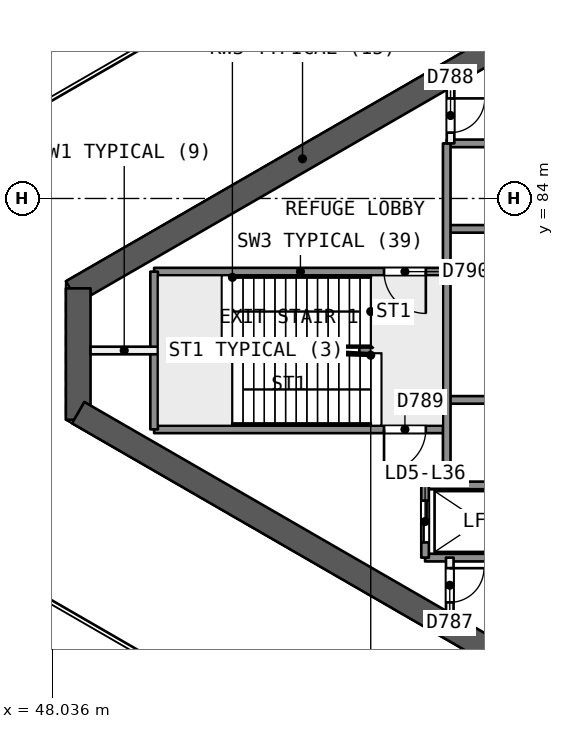
"""IFC4 building model, lengths in metres.
Left out: names, types, materials, properties, quantities, classifications, styles, units other than length and angle.
Written with IfcOpenShell. Run it as: python <this file> out.ifc"""

import sys

from ifc_helpers import new_model, si_unit, direction, frame, frame_2d, origin, place, context, subcontext, project, spatial, rectangle, extrude, element, fill, save


model = new_model("IFC4")
c1 = context("Model", 3, precision=1e-05, world=origin(), true_north=direction((0.0, 1.0)))
c2 = subcontext(c1, "Body", "Model", "MODEL_VIEW")
j1 = project(units=[si_unit("LENGTHUNIT", "METRE"), si_unit("PLANEANGLEUNIT", "RADIAN")], contexts=[c1])
p1 = place(None, origin())
s1 = spatial("IfcSite", under=j1, at=p1, CompositionType="ELEMENT")
p2 = place(p1, origin())
s2 = spatial("IfcBuilding", under=s1, at=p2, CompositionType="ELEMENT")
p3 = place(p2, frame((0.0, 0.0, 147.5)))
s3 = spatial("IfcBuildingStorey", under=s2, at=p3, CompositionType="ELEMENT", Elevation=147.5)
p4 = place(p3, frame((60.691, 88.545, 0.0), z_axis=(0.0, 0.0, 1.0), x_axis=(-0.866030607649, -0.499990986534, 0.0)))
e1 = element("IfcWall", 1, at=p4, inside=s3, PredefinedType="SHEAR", context=c2, shape_type="SweptSolid", body=[
    extrude(rectangle(XDim=14.009, YDim=0.65, at=frame_2d((7.004, 0.0))), origin(), (0.0, 0.0, 1.0), 8.8),
])
p5 = place(p3, frame((48.722, 81.635, 0.0), z_axis=(0.0, 0.0, 1.0), x_axis=(0.0, -1.0, 0.0)))
e2 = element("IfcWall", 2, at=p5, inside=s3, PredefinedType="SHEAR", context=c2, shape_type="SweptSolid", body=[
    extrude(rectangle(XDim=3.458, YDim=0.65, at=frame_2d((1.729, 0.0))), origin(), (0.0, 0.0, 1.0), 8.8),
])
p6 = place(p3, frame((48.722, 78.365, 0.0), z_axis=(0.0, 0.0, 1.0), x_axis=(0.866020036431, -0.500009296414, 0.0)))
e3 = element("IfcWall", 3, at=p6, inside=s3, PredefinedType="SHEAR", context=c2, shape_type="SweptSolid", body=[
    extrude(rectangle(XDim=14.146, YDim=0.65, at=frame_2d((7.073, 0.0))), origin(), (0.0, 0.0, 1.0), 8.8),
])
for number, where, z_axis, x_axis in (
    (4, (60.9, 85.45, 0.0), (0.0, 0.0, 1.0), (-1.0, 0.0, 0.0)),
    (5, (60.9, 83.2, 0.0), (0.0, 0.0, 1.0), (-1.0, 0.0, 0.0)),
):
    element("IfcWall", number, at=place(p3, frame(where, z_axis=z_axis, x_axis=x_axis)), inside=s3, PredefinedType="SOLIDWALL", context=c2, shape_type="SweptSolid", body=[
        extrude(rectangle(XDim=2.48, YDim=0.2, at=frame_2d((1.24, 0.0))), origin(), (0.0, 0.0, 1.0), 8.35),
    ])
p7 = place(p3, frame((58.42, 82.075, 0.0), z_axis=(0.0, 0.0, 1.0), x_axis=(-1.0, 0.0, 0.0)))
e6 = element("IfcWall", 6, at=p7, inside=s3, PredefinedType="SOLIDWALL", context=c2, shape_type="SweptSolid", body=[
    extrude(rectangle(XDim=7.7, YDim=0.2, at=frame_2d((3.85, 0.0))), origin(), (0.0, 0.0, 1.0), 8.35),
])
p8 = place(p7, frame((0.55, 0.0, 0.0)))
e7 = element("IfcOpeningElement", 7, at=p8, cuts=e6, PredefinedType="OPENING", context=c2, shape_type="SweptSolid", body=[
    extrude(rectangle(XDim=1.1, YDim=2.1, at=frame_2d((0.55, 1.05))), frame((0.0, 0.11, 0.0), z_axis=(0.0, -1.0, 0.0), x_axis=(1.0, 0.0, 0.0)), (0.0, 0.0, 1.0), 0.221),
])
p9 = place(p3, frame((58.32, 80.0, 0.0), z_axis=(0.0, 0.0, 1.0), x_axis=(-1.0, 0.0, 0.0)))
e8 = element("IfcWall", 8, at=p9, inside=s3, PredefinedType="SOLIDWALL", context=c2, shape_type="SweptSolid", body=[
    extrude(rectangle(XDim=2.2, YDim=0.2, at=frame_2d((1.1, 0.0))), origin(), (0.0, 0.0, 1.0), 8.35),
])
p10 = place(p3, frame((50.82, 80.0, 0.0), z_axis=(0.0, 0.0, 1.0), x_axis=(-1.0, 0.0, 0.0)))
e9 = element("IfcWall", 9, at=p10, inside=s3, PredefinedType="PARTITIONING", context=c2, shape_type="SweptSolid", body=[
    extrude(rectangle(XDim=1.773, YDim=0.2, at=frame_2d((0.887, 0.0))), origin(), (0.0, 0.0, 1.0), 8.35),
])
p11 = place(p3, frame((60.9, 78.7, 0.0), z_axis=(0.0, 0.0, 1.0), x_axis=(-1.0, 0.0, 0.0)))
e10 = element("IfcWall", 10, at=p11, inside=s3, PredefinedType="SOLIDWALL", context=c2, shape_type="SweptSolid", body=[
    extrude(rectangle(XDim=2.48, YDim=0.2, at=frame_2d((1.24, 0.0))), origin(), (0.0, 0.0, 1.0), 8.35),
])
p12 = place(p3, frame((58.42, 77.925, 0.0), z_axis=(0.0, 0.0, 1.0), x_axis=(-1.0, 0.0, 0.0)))
e11 = element("IfcWall", 11, at=p12, inside=s3, PredefinedType="SOLIDWALL", context=c2, shape_type="SweptSolid", body=[
    extrude(rectangle(XDim=7.7, YDim=0.2, at=frame_2d((3.85, 0.0))), origin(), (0.0, 0.0, 1.0), 8.35),
])
p13 = place(p12, frame((0.55, 0.0, 0.0)))
e12 = element("IfcOpeningElement", 12, at=p13, cuts=e11, PredefinedType="OPENING", context=c2, shape_type="SweptSolid", body=[
    extrude(rectangle(XDim=1.1, YDim=2.1, at=frame_2d((0.55, 1.05))), frame((0.0, 0.11, 0.0), z_axis=(0.0, -1.0, 0.0), x_axis=(1.0, 0.0, 0.0)), (0.0, 0.0, 1.0), 0.221),
])
for number, where, z_axis, x_axis in (
    (13, (60.9, 76.45, 0.0), (0.0, 0.0, 1.0), (-1.0, 0.0, 0.0)),
    (14, (60.9, 74.55, 0.0), (0.0, 0.0, 1.0), (-1.0, 0.0, 0.0)),
):
    element("IfcWall", number, at=place(p3, frame(where, z_axis=z_axis, x_axis=x_axis)), inside=s3, PredefinedType="SOLIDWALL", context=c2, shape_type="SweptSolid", body=[
        extrude(rectangle(XDim=3.05, YDim=0.2, at=frame_2d((1.525, 0.0))), origin(), (0.0, 0.0, 1.0), 8.35),
    ])
p14 = place(p3, frame((58.52, 86.917, 0.0), z_axis=(0.0, 0.0, 1.0), x_axis=(0.0, -1.0, 0.0)))
e15 = element("IfcWall", 15, at=p14, inside=s3, PredefinedType="PARTITIONING", context=c2, shape_type="SweptSolid", body=[
    extrude(rectangle(XDim=1.467, YDim=0.2, at=frame_2d((0.733, 0.0))), origin(), (0.0, 0.0, 1.0), 8.35),
])
p15 = place(p14, frame((0.283, 0.0, 0.0)))
e16 = element("IfcOpeningElement", 16, at=p15, cuts=e15, PredefinedType="OPENING", context=c2, shape_type="SweptSolid", body=[
    extrude(rectangle(XDim=0.9, YDim=2.1, at=frame_2d((0.45, 1.05))), frame((0.0, 0.11, 0.0), z_axis=(0.0, -1.0, 0.0), x_axis=(1.0, 0.0, 0.0)), (0.0, 0.0, 1.0), 0.221),
])
p16 = place(p3, frame((58.5, 74.55, 0.0), z_axis=(0.0, 0.0, 1.0), x_axis=(0.0, -1.0, 0.0)))
e17 = element("IfcWall", 17, at=p16, inside=s3, PredefinedType="PARTITIONING", context=c2, shape_type="SweptSolid", body=[
    extrude(rectangle(XDim=1.455, YDim=0.2, at=frame_2d((0.728, 0.0))), origin(), (0.0, 0.0, 1.0), 8.35),
])
p17 = place(p16, frame((0.278, 0.0, 0.0)))
e18 = element("IfcOpeningElement", 18, at=p17, cuts=e17, PredefinedType="OPENING", context=c2, shape_type="SweptSolid", body=[
    extrude(rectangle(XDim=0.9, YDim=2.1, at=frame_2d((0.45, 1.05))), frame((0.0, 0.11, 0.0), z_axis=(0.0, -1.0, 0.0), x_axis=(1.0, 0.0, 0.0)), (0.0, 0.0, 1.0), 0.221),
])
p18 = place(p3, frame((58.42, 85.45, 0.0), z_axis=(0.0, 0.0, 1.0), x_axis=(0.0, -1.0, 0.0)))
e19 = element("IfcWall", 19, at=p18, inside=s3, PredefinedType="SOLIDWALL", context=c2, shape_type="SweptSolid", body=[
    extrude(rectangle(XDim=9.0, YDim=0.2, at=frame_2d((4.5, 0.0))), origin(), (0.0, 0.0, 1.0), 8.35),
])
p19 = place(p3, frame((57.85, 76.45, 0.0), z_axis=(0.0, 0.0, 1.0), x_axis=(0.0, -1.0, 0.0)))
e20 = element("IfcWall", 20, at=p19, inside=s3, PredefinedType="SOLIDWALL", context=c2, shape_type="SweptSolid", body=[
    extrude(rectangle(XDim=1.9, YDim=0.2, at=frame_2d((0.95, 0.0))), origin(), (0.0, 0.0, 1.0), 8.35),
])
p20 = place(p19, frame((0.4, 0.0, 0.0)))
e21 = element("IfcOpeningElement", 21, at=p20, cuts=e20, PredefinedType="OPENING", context=c2, shape_type="SweptSolid", body=[
    extrude(rectangle(XDim=1.1, YDim=2.1, at=frame_2d((0.55, 1.05))), frame((0.0, 0.11, 0.0), z_axis=(0.0, -1.0, 0.0), x_axis=(1.0, 0.0, 0.0)), (0.0, 0.0, 1.0), 0.221),
])
p21 = place(p3, frame((50.72, 82.075, 0.0), z_axis=(0.0, 0.0, 1.0), x_axis=(0.0, -1.0, 0.0)))
e22 = element("IfcWall", 22, at=p21, inside=s3, PredefinedType="SOLIDWALL", context=c2, shape_type="SweptSolid", body=[
    extrude(rectangle(XDim=4.15, YDim=0.2, at=frame_2d((2.075, 0.0))), origin(), (0.0, 0.0, 1.0), 8.35),
])
p22 = place(p20, origin())
e23 = element("IfcDoor", 23, at=p22, inside=s3, OperationType="SLIDING_TO_RIGHT", PredefinedType="NOTDEFINED", context=c2, shape_type="SweptSolid", body=[
    extrude(rectangle(XDim=1.1, YDim=2.1, at=frame_2d((0.55, 1.05))), frame((0.0, 0.025, 0.0), z_axis=(0.0, -1.0, 0.0), x_axis=(1.0, 0.0, 0.0)), (0.0, 0.0, 1.0), 0.05),
])
fill(e21, e23)
p23 = place(p17, origin())
e24 = element("IfcDoor", 24, at=p23, inside=s3, OperationType="SINGLE_SWING_LEFT", PredefinedType="NOTDEFINED", context=c2, shape_type="SweptSolid", body=[
    extrude(rectangle(XDim=0.9, YDim=2.1, at=frame_2d((0.45, 1.05))), frame((0.0, 0.025, 0.0), z_axis=(0.0, -1.0, 0.0), x_axis=(1.0, 0.0, 0.0)), (0.0, 0.0, 1.0), 0.05),
])
fill(e18, e24)
p24 = place(p15, origin())
e25 = element("IfcDoor", 25, at=p24, inside=s3, OperationType="SINGLE_SWING_LEFT", PredefinedType="NOTDEFINED", context=c2, shape_type="SweptSolid", body=[
    extrude(rectangle(XDim=0.9, YDim=2.1, at=frame_2d((0.45, 1.05))), frame((0.0, 0.025, 0.0), z_axis=(0.0, -1.0, 0.0), x_axis=(1.0, 0.0, 0.0)), (0.0, 0.0, 1.0), 0.05),
])
fill(e16, e25)
p25 = place(p13, origin())
e26 = element("IfcDoor", 26, at=p25, inside=s3, OperationType="SINGLE_SWING_RIGHT", PredefinedType="NOTDEFINED", context=c2, shape_type="SweptSolid", body=[
    extrude(rectangle(XDim=1.1, YDim=2.1, at=frame_2d((0.55, 1.05))), frame((0.0, 0.025, 0.0), z_axis=(0.0, -1.0, 0.0), x_axis=(1.0, 0.0, 0.0)), (0.0, 0.0, 1.0), 0.05),
])
fill(e12, e26)
p26 = place(p8, origin())
e27 = element("IfcDoor", 27, at=p26, inside=s3, OperationType="SINGLE_SWING_LEFT", PredefinedType="NOTDEFINED", context=c2, shape_type="SweptSolid", body=[
    extrude(rectangle(XDim=1.1, YDim=2.1, at=frame_2d((0.55, 1.05))), frame((0.0, 0.025, 0.0), z_axis=(0.0, -1.0, 0.0), x_axis=(1.0, 0.0, 0.0)), (0.0, 0.0, 1.0), 0.05),
])
fill(e7, e27)
save(model, sys.argv[1])
